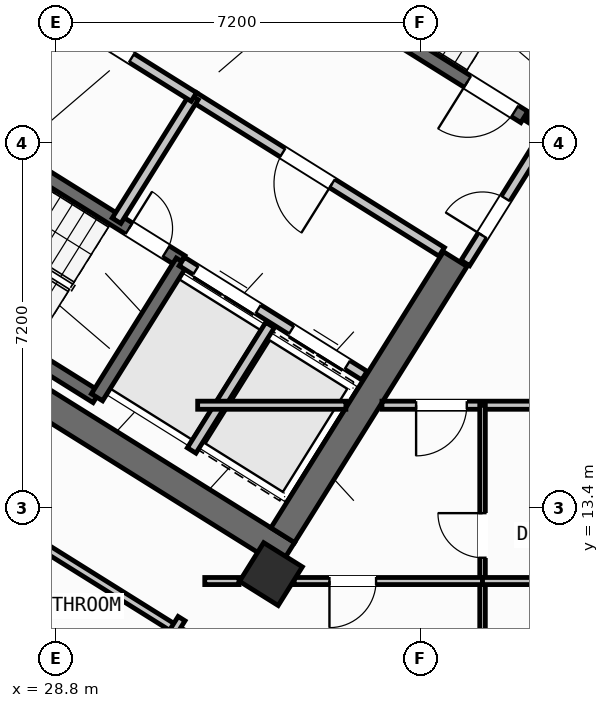
"""IFC4 building model, lengths in metres.
Left out: names, types, materials, properties, quantities, classifications, styles, units other than length and angle.
Written with IfcOpenShell. Run it as: python <this file> out.ifc"""

import sys

from ifc_helpers import new_model, si_unit, direction, frame, frame_2d, origin, origin_2d, place, context, subcontext, project, spatial, rectangle, hollow_rectangle, extrude, source, transform, mapped, element, fill, save


model = new_model("IFC4")
c1 = context("Model", 3, precision=1e-05, world=origin(), true_north=direction((0.0, 1.0)))
c2 = subcontext(c1, "Body", "Model", "MODEL_VIEW")
j1 = project(units=[si_unit("LENGTHUNIT", "METRE"), si_unit("PLANEANGLEUNIT", "RADIAN")], contexts=[c1])
p1 = place(None, origin())
s1 = spatial("IfcSite", under=j1, at=p1, CompositionType="ELEMENT")
p2 = place(p1, origin())
s2 = spatial("IfcBuilding", under=s1, at=p2, CompositionType="ELEMENT")
p3 = place(p2, frame((0.0, 0.0, 162.3)))
s3 = spatial("IfcBuildingStorey", under=s2, at=p3, CompositionType="ELEMENT", Elevation=162.3)
p4 = place(p3, frame((33.366, 12.477, 0.0), z_axis=(0.0, 0.0, 1.0), x_axis=(-0.848047359947, 0.529920442413, 0.0)))
e1 = element("IfcWall", 1, at=p4, inside=s3, PredefinedType="SHEAR", context=c2, shape_type="SweptSolid", body=[
    extrude(rectangle(XDim=13.14, YDim=0.55, at=frame_2d((6.57, 0.0))), origin(), (0.0, 0.0, 1.0), 3.35),
])
p5 = place(p3, frame((40.194, 23.922, 0.0), z_axis=(0.0, 0.0, 1.0), x_axis=(-0.529888438328, -0.848067357541, 0.0)))
e2 = element("IfcWall", 2, at=p5, inside=s3, PredefinedType="SHEAR", context=c2, shape_type="SweptSolid", body=[
    extrude(rectangle(XDim=3.575, YDim=0.55, at=frame_2d((1.788, 0.0))), origin(), (0.0, 0.0, 1.0), 3.35),
])
p6 = place(p3, frame((36.683, 18.304, 0.0), z_axis=(0.0, 0.0, 1.0), x_axis=(-0.529896466841, -0.848062341122, 0.0)))
e3 = element("IfcWall", 3, at=p6, inside=s3, PredefinedType="SHEAR", context=c2, shape_type="SweptSolid", body=[
    extrude(rectangle(XDim=6.425, YDim=0.55, at=frame_2d((3.212, 0.0))), origin(), (0.0, 0.0, 1.0), 3.35),
])
m1 = source(origin(), c2, "Body", "SweptSolid", [
    extrude(hollow_rectangle(XDim=0.9, YDim=0.9, WallThickness=0.036, at=origin_2d()), origin(), (0.0, 0.0, 1.0), 3.6),
])
p7 = place(p3, frame((33.046, 12.087, 0.0), z_axis=(0.0, 0.0, 1.0), x_axis=(-0.848048096156, 0.529919264233, 0.0)))
e4 = element("IfcColumn", 4, at=p7, inside=s3, PredefinedType="COLUMN", context=c2, shape_type="MappedRepresentation", body=[
    mapped(m1, transform((0.0, 0.0, 0.0), scale=1.0)),
])
p8 = place(p3, frame((29.268, 6.429, 0.0), z_axis=(0.0, 0.0, 1.0), x_axis=(-0.848049971435, 0.529916263149, 0.0)))
e5 = element("IfcWall", 5, at=p8, inside=s3, PredefinedType="STANDARD", context=c2, shape_type="SweptSolid", body=[
    extrude(rectangle(XDim=31.588, YDim=0.32, at=frame_2d((15.794, 0.0))), origin(), (0.0, 0.0, 1.0), 3.35),
])
p9 = place(p8, frame((16.362, 0.0, 0.0)))
e6 = element("IfcOpeningElement", 6, at=p9, cuts=e5, PredefinedType="OPENING", context=c2, shape_type="SweptSolid", body=[
    extrude(rectangle(XDim=1.2, YDim=2.15, at=frame_2d((0.6, 1.075))), frame((0.0, 0.17, 0.0), z_axis=(0.0, -1.0, 0.0), x_axis=(1.0, 0.0, 0.0)), (0.0, 0.0, 1.0), 0.34),
])
p10 = place(p8, frame((2.989, 0.0, 0.8)))
e7 = element("IfcOpeningElement", 7, at=p10, cuts=e5, PredefinedType="OPENING", context=c2, shape_type="SweptSolid", body=[
    extrude(rectangle(XDim=2.1, YDim=1.55, at=frame_2d((1.05, 0.775))), frame((0.0, 0.17, 0.0), z_axis=(0.0, -1.0, 0.0), x_axis=(1.0, 0.0, 0.0)), (0.0, 0.0, 1.0), 0.34),
])
p11 = place(p8, frame((8.359, 0.0, 0.8)))
e8 = element("IfcOpeningElement", 8, at=p11, cuts=e5, PredefinedType="OPENING", context=c2, shape_type="SweptSolid", body=[
    extrude(rectangle(XDim=2.1, YDim=1.55, at=frame_2d((1.05, 0.775))), frame((0.0, 0.17, 0.0), z_axis=(0.0, -1.0, 0.0), x_axis=(1.0, 0.0, 0.0)), (0.0, 0.0, 1.0), 0.34),
])
p12 = place(p8, frame((13.284, 0.0, 0.95)))
e9 = element("IfcOpeningElement", 9, at=p12, cuts=e5, PredefinedType="OPENING", context=c2, shape_type="SweptSolid", body=[
    extrude(rectangle(XDim=1.2, YDim=1.4, at=frame_2d((0.6, 0.7))), frame((0.0, 0.17, 0.0), z_axis=(0.0, -1.0, 0.0), x_axis=(1.0, 0.0, 0.0)), (0.0, 0.0, 1.0), 0.34),
])
p13 = place(p8, frame((20.39, 0.0, 0.95)))
e10 = element("IfcOpeningElement", 10, at=p13, cuts=e5, PredefinedType="OPENING", context=c2, shape_type="SweptSolid", body=[
    extrude(rectangle(XDim=1.2, YDim=1.4, at=frame_2d((0.6, 0.7))), frame((0.0, 0.17, 0.0), z_axis=(0.0, -1.0, 0.0), x_axis=(1.0, 0.0, 0.0)), (0.0, 0.0, 1.0), 0.34),
])
p14 = place(p8, frame((23.715, 0.0, 1.0)))
e11 = element("IfcOpeningElement", 11, at=p14, cuts=e5, PredefinedType="OPENING", context=c2, shape_type="SweptSolid", body=[
    extrude(rectangle(XDim=0.9, YDim=1.25, at=frame_2d((0.45, 0.625))), frame((0.0, 0.17, 0.0), z_axis=(0.0, -1.0, 0.0), x_axis=(1.0, 0.0, 0.0)), (0.0, 0.0, 1.0), 0.34),
])
p15 = place(p8, frame((26.106, 0.0, 0.85)))
e12 = element("IfcOpeningElement", 12, at=p15, cuts=e5, PredefinedType="OPENING", context=c2, shape_type="SweptSolid", body=[
    extrude(rectangle(XDim=1.5, YDim=1.5, at=frame_2d((0.75, 0.75))), frame((0.0, 0.17, 0.0), z_axis=(0.0, -1.0, 0.0), x_axis=(1.0, 0.0, 0.0)), (0.0, 0.0, 1.0), 0.34),
])
p16 = place(p8, frame((29.068, 0.0, 0.85)))
e13 = element("IfcOpeningElement", 13, at=p16, cuts=e5, PredefinedType="OPENING", context=c2, shape_type="SweptSolid", body=[
    extrude(rectangle(XDim=1.8, YDim=1.5, at=frame_2d((0.9, 0.75))), frame((0.0, 0.17, 0.0), z_axis=(0.0, -1.0, 0.0), x_axis=(1.0, 0.0, 0.0)), (0.0, 0.0, 1.0), 0.34),
])
p17 = place(p3, frame((29.605, 15.581, 0.0), z_axis=(0.0, 0.0, 1.0), x_axis=(-0.848036911448, 0.529937163087, 0.0)))
e14 = element("IfcWall", 14, at=p17, inside=s3, PredefinedType="SHEAR", context=c2, shape_type="SweptSolid", body=[
    extrude(rectangle(XDim=7.46, YDim=0.26, at=frame_2d((3.73, 0.0))), origin(), (0.0, 0.0, 1.0), 3.35),
])
p18 = place(p3, frame((31.28, 18.261, 0.0), z_axis=(0.0, 0.0, 1.0), x_axis=(-0.848051618787, 0.529913626805, 0.0)))
e15 = element("IfcWall", 15, at=p18, inside=s3, PredefinedType="SHEAR", context=c2, shape_type="SweptSolid", body=[
    extrude(rectangle(XDim=7.46, YDim=0.26, at=frame_2d((3.73, 0.0))), origin(), (0.0, 0.0, 1.0), 3.35),
])
p19 = place(p18, frame((0.36, 0.0, 0.0)))
e16 = element("IfcOpeningElement", 16, at=p19, cuts=e15, PredefinedType="OPENING", context=c2, shape_type="SweptSolid", body=[
    extrude(rectangle(XDim=0.86, YDim=2.05, at=frame_2d((0.43, 1.025))), frame((0.0, 0.14, 0.0), z_axis=(0.0, -1.0, 0.0), x_axis=(1.0, 0.0, 0.0)), (0.0, 0.0, 1.0), 0.28),
])
p20 = place(p3, frame((31.288, 18.256, 0.0), z_axis=(0.0, 0.0, 1.0), x_axis=(-0.529943379326, -0.848033026897, 0.0)))
e17 = element("IfcWall", 17, at=p20, inside=s3, PredefinedType="SHEAR", context=c2, shape_type="SweptSolid", body=[
    extrude(rectangle(XDim=3.16, YDim=0.26, at=frame_2d((1.58, 0.0))), origin(), (0.0, 0.0, 1.0), 3.35),
])
p21 = place(p3, frame((38.046, 21.108, 0.0), z_axis=(0.0, 0.0, 1.0), x_axis=(-0.848054434086, 0.529909121291, 0.0)))
e18 = element("IfcWall", 18, at=p21, inside=s3, PredefinedType="SHEAR", context=c2, shape_type="SweptSolid", body=[
    extrude(rectangle(XDim=7.33, YDim=0.26, at=frame_2d((3.665, 0.0))), origin(), (0.0, 0.0, 1.0), 3.35),
])
p22 = place(p21, frame((0.22, 0.0, 0.0)))
e19 = element("IfcOpeningElement", 19, at=p22, cuts=e18, PredefinedType="OPENING", context=c2, shape_type="SweptSolid", body=[
    extrude(rectangle(XDim=1.1, YDim=2.1, at=frame_2d((0.55, 1.05))), frame((0.0, 0.14, 0.0), z_axis=(0.0, -1.0, 0.0), x_axis=(1.0, 0.0, 0.0)), (0.0, 0.0, 1.0), 0.28),
])
p23 = place(p3, frame((34.891, 16.005, 0.0), z_axis=(0.0, 0.0, 1.0), x_axis=(-0.848062873452, 0.529895614884, 0.0)))
e20 = element("IfcWall", 20, at=p23, inside=s3, PredefinedType="STANDARD", context=c2, shape_type="SweptSolid", body=[
    extrude(rectangle(XDim=4.248, YDim=0.2, at=frame_2d((2.124, 0.0))), origin(), (0.0, 0.0, 1.0), 3.34),
])
p24 = place(p23, frame((0.398, 0.0, 0.0)))
e21 = element("IfcOpeningElement", 21, at=p24, cuts=e20, PredefinedType="OPENING", context=c2, shape_type="SweptSolid", body=[
    extrude(rectangle(XDim=1.3, YDim=2.2, at=frame_2d((0.65, 1.1))), frame((0.0, 0.11, 0.0), z_axis=(0.0, -1.0, 0.0), x_axis=(1.0, 0.0, 0.0)), (0.0, 0.0, 1.0), 0.22),
])
p25 = place(p23, frame((2.473, 0.0, 0.0)))
e22 = element("IfcOpeningElement", 22, at=p25, cuts=e20, PredefinedType="OPENING", context=c2, shape_type="SweptSolid", body=[
    extrude(rectangle(XDim=1.45, YDim=2.25, at=frame_2d((0.725, 1.125))), frame((0.0, 0.11, 0.0), z_axis=(0.0, -1.0, 0.0), x_axis=(1.0, 0.0, 0.0)), (0.0, 0.0, 1.0), 0.22),
])
p26 = place(p3, frame((36.417, 18.447, 0.0), z_axis=(0.0, 0.0, 1.0), x_axis=(-0.848064879198, 0.529892404805, 0.0)))
e23 = element("IfcWall", 23, at=p26, inside=s3, PredefinedType="STANDARD", context=c2, shape_type="SweptSolid", body=[
    extrude(rectangle(XDim=5.768, YDim=0.2, at=frame_2d((2.884, 0.0))), origin(), (0.0, 0.0, 1.0), 3.34),
])
p27 = place(p26, frame((2.548, 0.0, 0.0)))
e24 = element("IfcOpeningElement", 24, at=p27, cuts=e23, PredefinedType="OPENING", context=c2, shape_type="SweptSolid", body=[
    extrude(rectangle(XDim=1.15, YDim=2.1, at=frame_2d((0.575, 1.05))), frame((0.0, 0.11, 0.0), z_axis=(0.0, -1.0, 0.0), x_axis=(1.0, 0.0, 0.0)), (0.0, 0.0, 1.0), 0.22),
])
p28 = place(p3, frame((33.029, 17.003, 0.0), z_axis=(0.0, 0.0, 1.0), x_axis=(-0.529916267533, -0.848049968695, 0.0)))
e25 = element("IfcWall", 25, at=p28, inside=s3, PredefinedType="STANDARD", context=c2, shape_type="SweptSolid", body=[
    extrude(rectangle(XDim=2.92, YDim=0.2, at=frame_2d((1.46, 0.0))), origin(), (0.0, 0.0, 1.0), 3.34),
])
for number, where, z_axis, x_axis in (
    (26, (31.525, 21.504, 0.0), (0.0, 0.0, 1.0), (-0.53, -0.848, 0.0)),
    (27, (28.71, 23.263, 0.0), (0.0, 0.0, 1.0), (-0.53, -0.848, 0.0)),
):
    element("IfcWall", number, at=place(p3, frame(where, z_axis=z_axis, x_axis=x_axis)), inside=s3, PredefinedType="STANDARD", context=c2, shape_type="SweptSolid", body=[
        extrude(rectangle(XDim=2.88, YDim=0.2, at=frame_2d((1.44, 0.0))), origin(), (0.0, 0.0, 1.0), 3.34),
    ])
p29 = place(p3, frame((31.525, 21.504, 0.0), z_axis=(0.0, 0.0, 1.0), x_axis=(-0.848040211232, 0.529931882541, 0.0)))
e28 = element("IfcWall", 28, at=p29, inside=s3, PredefinedType="STANDARD", context=c2, shape_type="SweptSolid", body=[
    extrude(rectangle(XDim=6.218, YDim=0.2, at=frame_2d((3.109, 0.0))), origin(), (0.0, 0.0, 1.0), 3.34),
])
p30 = place(p29, frame((4.4, 0.0, 0.0)))
e29 = element("IfcOpeningElement", 29, at=p30, cuts=e28, PredefinedType="OPENING", context=c2, shape_type="SweptSolid", body=[
    extrude(rectangle(XDim=0.86, YDim=2.05, at=frame_2d((0.43, 1.025))), frame((0.0, 0.11, 0.0), z_axis=(0.0, -1.0, 0.0), x_axis=(1.0, 0.0, 0.0)), (0.0, 0.0, 1.0), 0.22),
])
p31 = place(p29, frame((1.45, 0.0, 0.0)))
e30 = element("IfcOpeningElement", 30, at=p31, cuts=e28, PredefinedType="OPENING", context=c2, shape_type="SweptSolid", body=[
    extrude(rectangle(XDim=0.86, YDim=2.05, at=frame_2d((0.43, 1.025))), frame((0.0, 0.11, 0.0), z_axis=(0.0, -1.0, 0.0), x_axis=(1.0, 0.0, 0.0)), (0.0, 0.0, 1.0), 0.22),
])
p32 = place(p3, frame((32.164, 10.374, 0.0), z_axis=(0.0, 0.0, 1.0), x_axis=(-0.848044107957, 0.529925646633, 0.0)))
e31 = element("IfcWall", 31, at=p32, inside=s3, PredefinedType="PARTITIONING", context=c2, shape_type="SweptSolid", body=[
    extrude(rectangle(XDim=15.57, YDim=0.16, at=frame_2d((7.785, 0.0))), origin(), (0.0, 0.0, 1.0), 3.34),
])
p33 = place(p32, frame((10.83, 0.0, 0.0)))
e32 = element("IfcOpeningElement", 32, at=p33, cuts=e31, PredefinedType="OPENING", context=c2, shape_type="SweptSolid", body=[
    extrude(rectangle(XDim=1.0, YDim=2.1, at=frame_2d((0.5, 1.05))), frame((0.0, 0.09, 0.0), z_axis=(0.0, -1.0, 0.0), x_axis=(1.0, 0.0, 0.0)), (0.0, 0.0, 1.0), 0.18),
])
p34 = place(p3, frame((31.282, 11.208, 0.0), z_axis=(0.0, 0.0, 1.0), x_axis=(-0.529938869374, -0.84803584519, 0.0)))
e33 = element("IfcWall", 33, at=p34, inside=s3, PredefinedType="PARTITIONING", context=c2, shape_type="SweptSolid", body=[
    extrude(rectangle(XDim=5.48, YDim=0.16, at=frame_2d((2.74, 0.0))), origin(), (0.0, 0.0, 1.0), 3.34),
])
p35 = place(p3, frame((29.72, 8.859, 0.0), z_axis=(0.0, 0.0, 1.0), x_axis=(-0.848049134363, 0.529917602752, 0.0)))
e34 = element("IfcWall", 34, at=p35, inside=s3, PredefinedType="PLUMBINGWALL", context=c2, shape_type="SweptSolid", body=[
    extrude(rectangle(XDim=14.3, YDim=0.14, at=frame_2d((7.15, 0.0))), origin(), (0.0, 0.0, 1.0), 3.34),
])
p36 = place(p35, frame((9.57, 0.0, 0.0)))
e35 = element("IfcOpeningElement", 35, at=p36, cuts=e34, PredefinedType="OPENING", context=c2, shape_type="SweptSolid", body=[
    extrude(rectangle(XDim=0.92, YDim=2.08, at=frame_2d((0.46, 1.04))), frame((0.0, 0.08, 0.0), z_axis=(0.0, -1.0, 0.0), x_axis=(1.0, 0.0, 0.0)), (0.0, 0.0, 1.0), 0.16),
])
p37 = place(p3, frame((38.451, 20.737, 0.0), z_axis=(0.0, 0.0, 1.0), x_axis=(-0.529924799939, -0.848044637038, 0.0)))
e36 = element("IfcWall", 36, at=p37, inside=s3, PredefinedType="STANDARD", context=c2, shape_type="SweptSolid", body=[
    extrude(rectangle(XDim=2.96, YDim=0.2, at=frame_2d((1.48, 0.0))), origin(), (0.0, 0.0, 1.0), 3.34),
])
p38 = place(p37, frame((1.46, 0.0, 0.0)))
e37 = element("IfcOpeningElement", 37, at=p38, cuts=e36, PredefinedType="OPENING", context=c2, shape_type="SweptSolid", body=[
    extrude(rectangle(XDim=0.86, YDim=2.05, at=frame_2d((0.43, 1.025))), frame((0.0, 0.11, 0.0), z_axis=(0.0, -1.0, 0.0), x_axis=(1.0, 0.0, 0.0)), (0.0, 0.0, 1.0), 0.22),
])
p39 = place(p3, frame((31.6, 15.42, 0.0), z_axis=(0.0, 0.0, 1.0), x_axis=(1.0, 0.0, 0.0)))
e38 = element("IfcWall", 38, at=p39, inside=s3, PredefinedType="PARTITIONING", context=c2, shape_type="SweptSolid", body=[
    extrude(rectangle(XDim=2.925, YDim=0.16, at=frame_2d((1.462, 0.0))), origin(), (0.0, 0.0, 1.0), 3.34),
])
p40 = place(p3, frame((35.237, 15.42, 0.0), z_axis=(0.0, 0.0, 1.0), x_axis=(1.0, 0.0, 0.0)))
e39 = element("IfcWall", 39, at=p40, inside=s3, PredefinedType="PARTITIONING", context=c2, shape_type="SweptSolid", body=[
    extrude(rectangle(XDim=15.432, YDim=0.16, at=frame_2d((7.716, 0.0))), origin(), (0.0, 0.0, 1.0), 3.34),
])
p41 = place(p40, frame((0.674, 0.0, 0.0)))
e40 = element("IfcOpeningElement", 40, at=p41, cuts=e39, PredefinedType="OPENING", context=c2, shape_type="SweptSolid", body=[
    extrude(rectangle(XDim=1.0, YDim=2.1, at=frame_2d((0.5, 1.05))), frame((0.0, 0.09, 0.0), z_axis=(0.0, -1.0, 0.0), x_axis=(1.0, 0.0, 0.0)), (0.0, 0.0, 1.0), 0.18),
])
p42 = place(p40, frame((9.094, 0.0, 0.0)))
e41 = element("IfcOpeningElement", 41, at=p42, cuts=e39, PredefinedType="OPENING", context=c2, shape_type="SweptSolid", body=[
    extrude(rectangle(XDim=1.0, YDim=2.1, at=frame_2d((0.5, 1.05))), frame((0.0, 0.09, 0.0), z_axis=(0.0, -1.0, 0.0), x_axis=(1.0, 0.0, 0.0)), (0.0, 0.0, 1.0), 0.18),
])
p43 = place(p3, frame((37.222, 1.96, 0.0), z_axis=(0.0, 0.0, 1.0), x_axis=(0.0, 1.0, 0.0)))
e42 = element("IfcWall", 42, at=p43, inside=s3, PredefinedType="PARTITIONING", context=c2, shape_type="SweptSolid", body=[
    extrude(rectangle(XDim=13.46, YDim=0.11, at=frame_2d((6.73, 0.0))), origin(), (0.0, 0.0, 1.0), 3.34),
])
p44 = place(p43, frame((5.2, 0.0, 0.0)))
e43 = element("IfcOpeningElement", 43, at=p44, cuts=e42, PredefinedType="OPENING", context=c2, shape_type="SweptSolid", body=[
    extrude(rectangle(XDim=0.92, YDim=2.08, at=frame_2d((0.46, 1.04))), frame((0.0, 0.065, 0.0), z_axis=(0.0, -1.0, 0.0), x_axis=(1.0, 0.0, 0.0)), (0.0, 0.0, 1.0), 0.13),
])
p45 = place(p43, frame((10.45, 0.0, 0.0)))
e44 = element("IfcOpeningElement", 44, at=p45, cuts=e42, PredefinedType="OPENING", context=c2, shape_type="SweptSolid", body=[
    extrude(rectangle(XDim=0.88, YDim=2.08, at=frame_2d((0.44, 1.04))), frame((0.0, 0.065, 0.0), z_axis=(0.0, -1.0, 0.0), x_axis=(1.0, 0.0, 0.0)), (0.0, 0.0, 1.0), 0.13),
])
p46 = place(p3, frame((31.74, 11.95, 0.0), z_axis=(0.0, 0.0, 1.0), x_axis=(1.0, 0.0, 0.0)))
e45 = element("IfcWall", 45, at=p46, inside=s3, PredefinedType="PLUMBINGWALL", context=c2, shape_type="SweptSolid", body=[
    extrude(rectangle(XDim=0.676, YDim=0.14, at=frame_2d((0.338, 0.0))), origin(), (0.0, 0.0, 1.0), 3.34),
])
p47 = place(p3, frame((33.505, 11.95, 0.0), z_axis=(0.0, 0.0, 1.0), x_axis=(1.0, 0.0, 0.0)))
e46 = element("IfcWall", 46, at=p47, inside=s3, PredefinedType="PLUMBINGWALL", context=c2, shape_type="SweptSolid", body=[
    extrude(rectangle(XDim=3.717, YDim=0.14, at=frame_2d((1.858, 0.0))), origin(), (0.0, 0.0, 1.0), 2.525),
])
p48 = place(p47, frame((0.696, 0.0, 0.0)))
e47 = element("IfcOpeningElement", 47, at=p48, cuts=e46, PredefinedType="OPENING", context=c2, shape_type="SweptSolid", body=[
    extrude(rectangle(XDim=0.92, YDim=2.08, at=frame_2d((0.46, 1.04))), frame((0.0, 0.08, 0.0), z_axis=(0.0, -1.0, 0.0), x_axis=(1.0, 0.0, 0.0)), (0.0, 0.0, 1.0), 0.16),
])
p49 = place(p3, frame((37.222, 11.95, 0.0), z_axis=(0.0, 0.0, 1.0), x_axis=(1.0, 0.0, 0.0)))
e48 = element("IfcWall", 48, at=p49, inside=s3, PredefinedType="PLUMBINGWALL", context=c2, shape_type="SweptSolid", body=[
    extrude(rectangle(XDim=4.728, YDim=0.14, at=frame_2d((2.364, 0.0))), origin(), (0.0, 0.0, 1.0), 2.525),
])
m2 = source(origin(), c2, "Body", "SweptSolid", [
    extrude(rectangle(XDim=0.86, YDim=2.05, at=frame_2d((0.43, 1.025))), frame((0.0, 0.025, 0.0), z_axis=(0.0, -1.0, 0.0), x_axis=(1.0, 0.0, 0.0)), (0.0, 0.0, 1.0), 0.05),
])
p50 = place(p19, frame((0.86, 0.0, 0.0), z_axis=(0.0, 0.0, 1.0), x_axis=(-1.0, 0.0, 0.0)))
e49 = element("IfcDoor", 49, at=p50, inside=s3, OperationType="SINGLE_SWING_LEFT", PredefinedType="DOOR", context=c2, shape_type="MappedRepresentation", body=[
    mapped(m2, transform((0.0, 0.0, 0.0), scale=1.0)),
])
fill(e16, e49)
m3 = source(origin(), c2, "Body", "SweptSolid", [
    extrude(rectangle(XDim=1.1, YDim=2.1, at=frame_2d((0.55, 1.05))), frame((0.0, 0.025, 0.0), z_axis=(0.0, -1.0, 0.0), x_axis=(1.0, 0.0, 0.0)), (0.0, 0.0, 1.0), 0.05),
])
p51 = place(p22, origin())
e50 = element("IfcDoor", 50, at=p51, inside=s3, OperationType="SINGLE_SWING_RIGHT", PredefinedType="DOOR", context=c2, shape_type="MappedRepresentation", body=[
    mapped(m3, transform((0.0, 0.0, 0.0), scale=1.0)),
])
fill(e19, e50)
m4 = source(origin(), c2, "Body", "SweptSolid", [
    extrude(rectangle(XDim=1.15, YDim=2.1, at=frame_2d((0.575, 1.05))), frame((0.0, 0.025, 0.0), z_axis=(0.0, -1.0, 0.0), x_axis=(1.0, 0.0, 0.0)), (0.0, 0.0, 1.0), 0.05),
])
p52 = place(p27, origin())
e51 = element("IfcDoor", 51, at=p52, inside=s3, OperationType="SINGLE_SWING_LEFT", PredefinedType="DOOR", context=c2, shape_type="MappedRepresentation", body=[
    mapped(m4, transform((0.0, 0.0, 0.0), scale=1.0)),
])
fill(e24, e51)
m5 = source(origin(), c2, "Body", "SweptSolid", [
    extrude(rectangle(XDim=1.3, YDim=2.2, at=frame_2d((0.65, 1.1))), frame((0.0, 0.025, 0.0), z_axis=(0.0, -1.0, 0.0), x_axis=(1.0, 0.0, 0.0)), (0.0, 0.0, 1.0), 0.05),
])
p53 = place(p24, origin())
e52 = element("IfcDoor", 52, at=p53, inside=s3, OperationType="DOUBLE_DOOR_SLIDING", PredefinedType="DOOR", context=c2, shape_type="MappedRepresentation", body=[
    mapped(m5, transform((0.0, 0.0, 0.0), scale=1.0)),
])
fill(e21, e52)
m6 = source(origin(), c2, "Body", "SweptSolid", [
    extrude(rectangle(XDim=1.45, YDim=2.25, at=frame_2d((0.725, 1.125))), frame((0.0, 0.025, 0.0), z_axis=(0.0, -1.0, 0.0), x_axis=(1.0, 0.0, 0.0)), (0.0, 0.0, 1.0), 0.05),
])
p54 = place(p25, origin())
e53 = element("IfcDoor", 53, at=p54, inside=s3, OperationType="DOUBLE_DOOR_SLIDING", PredefinedType="DOOR", context=c2, shape_type="MappedRepresentation", body=[
    mapped(m6, transform((0.0, 0.0, 0.0), scale=1.0)),
])
fill(e22, e53)
p55 = place(p31, frame((0.86, 0.0, 0.0), z_axis=(0.0, 0.0, 1.0), x_axis=(-1.0, 0.0, 0.0)))
e54 = element("IfcDoor", 54, at=p55, inside=s3, OperationType="SINGLE_SWING_LEFT", PredefinedType="DOOR", context=c2, shape_type="MappedRepresentation", body=[
    mapped(m2, transform((0.0, 0.0, 0.0), scale=1.0)),
])
fill(e30, e54)
p56 = place(p38, frame((0.86, 0.0, 0.0), z_axis=(0.0, 0.0, 1.0), x_axis=(-1.0, 0.0, 0.0)))
e55 = element("IfcDoor", 55, at=p56, inside=s3, OperationType="SINGLE_SWING_LEFT", PredefinedType="DOOR", context=c2, shape_type="MappedRepresentation", body=[
    mapped(m2, transform((0.0, 0.0, 0.0), scale=1.0)),
])
fill(e37, e55)
m7 = source(origin(), c2, "Body", "SweptSolid", [
    extrude(rectangle(XDim=1.0, YDim=2.1, at=frame_2d((0.5, 1.05))), frame((0.0, 0.025, 0.0), z_axis=(0.0, -1.0, 0.0), x_axis=(1.0, 0.0, 0.0)), (0.0, 0.0, 1.0), 0.05),
])
p57 = place(p41, frame((1.0, 0.0, 0.0), z_axis=(0.0, 0.0, 1.0), x_axis=(-1.0, 0.0, 0.0)))
e56 = element("IfcDoor", 56, at=p57, inside=s3, OperationType="SINGLE_SWING_RIGHT", PredefinedType="DOOR", context=c2, shape_type="MappedRepresentation", body=[
    mapped(m7, transform((0.0, 0.0, 0.0), scale=1.0)),
])
fill(e40, e56)
m8 = source(origin(), c2, "Body", "SweptSolid", [
    extrude(rectangle(XDim=0.92, YDim=2.08, at=frame_2d((0.46, 1.04))), frame((0.0, 0.025, 0.0), z_axis=(0.0, -1.0, 0.0), x_axis=(1.0, 0.0, 0.0)), (0.0, 0.0, 1.0), 0.05),
])
p58 = place(p48, frame((0.92, 0.0, 0.0), z_axis=(0.0, 0.0, 1.0), x_axis=(-1.0, 0.0, 0.0)))
e57 = element("IfcDoor", 57, at=p58, inside=s3, OperationType="SINGLE_SWING_RIGHT", PredefinedType="DOOR", context=c2, shape_type="MappedRepresentation", body=[
    mapped(m8, transform((0.0, 0.0, 0.0), scale=1.0)),
])
fill(e47, e57)
m9 = source(origin(), c2, "Body", "SweptSolid", [
    extrude(rectangle(XDim=0.88, YDim=2.08, at=frame_2d((0.44, 1.04))), frame((0.0, 0.025, 0.0), z_axis=(0.0, -1.0, 0.0), x_axis=(1.0, 0.0, 0.0)), (0.0, 0.0, 1.0), 0.05),
])
p59 = place(p45, origin())
e58 = element("IfcDoor", 58, at=p59, inside=s3, OperationType="SINGLE_SWING_RIGHT", PredefinedType="DOOR", context=c2, shape_type="MappedRepresentation", body=[
    mapped(m9, transform((0.0, 0.0, 0.0), scale=1.0)),
])
fill(e44, e58)
save(model, sys.argv[1])
